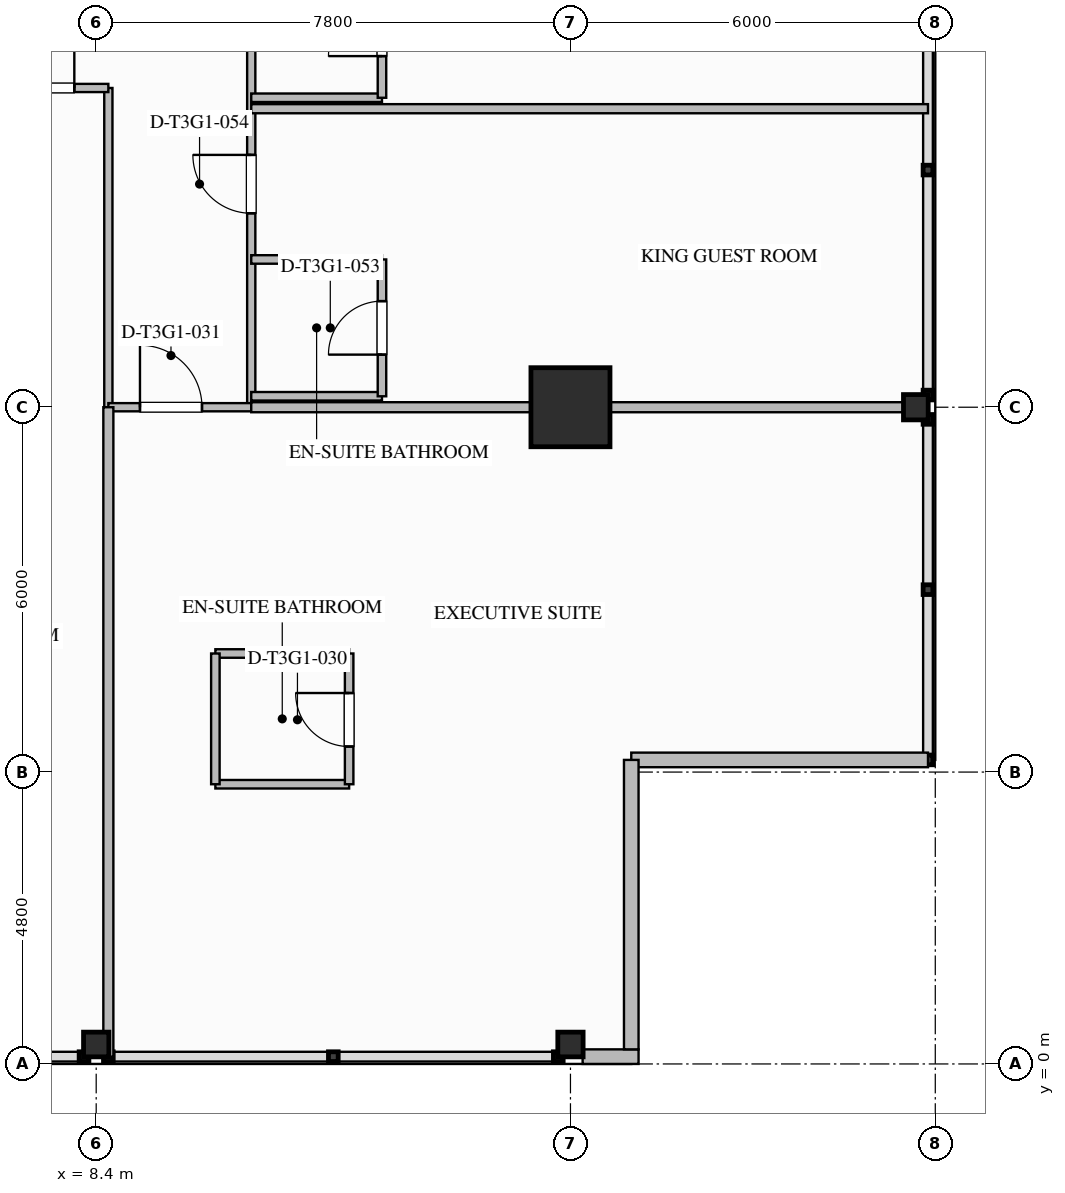
"""IFC4 building model, lengths in metres.
Left out: names, types, materials, properties, quantities, classifications, styles, units other than length and angle.
Written with IfcOpenShell. Run it as: python <this file> out.ifc"""

import sys

from ifc_helpers import new_model, si_unit, direction, frame, frame_2d, origin, origin_2d, place, context, subcontext, project, spatial, rectangle, i_section, extrude, element, fill, save


model = new_model("IFC4")
c1 = context("Model", 3, precision=1e-05, world=origin(), true_north=direction((0.0, 1.0)))
c2 = subcontext(c1, "Body", "Model", "MODEL_VIEW")
j1 = project(units=[si_unit("LENGTHUNIT", "METRE"), si_unit("PLANEANGLEUNIT", "RADIAN")], contexts=[c1])
p1 = place(None, origin())
s1 = spatial("IfcSite", under=j1, at=p1, CompositionType="ELEMENT")
p2 = place(p1, origin())
s2 = spatial("IfcBuilding", under=s1, at=p2, CompositionType="ELEMENT")
p3 = place(p2, frame((0.0, 0.0, 150.4)))
s3 = spatial("IfcBuildingStorey", under=s2, at=p3, CompositionType="ELEMENT", Elevation=150.4)
p4 = place(p3, frame((16.2, 10.8, 0.0), z_axis=(0.0, 0.0, 1.0), x_axis=(1.0, 0.0, 0.0)))
e1 = element("IfcColumn", 1, at=p4, inside=s3, PredefinedType="COLUMN", context=c2, shape_type="SweptSolid", body=[
    extrude(rectangle(XDim=1.3, YDim=1.3, at=origin_2d()), origin(), (0.0, 0.0, 1.0), 3.55),
])
for number, where, z_axis, x_axis in (
    (2, (21.88, 10.8, 0.0), (0.0, 0.0, 1.0), (1.0, 0.0, 0.0)),
    (3, (8.4, 0.32, 0.0), (0.0, 0.0, 1.0), (0.0, 1.0, 0.0)),
    (4, (16.2, 0.32, 0.0), (0.0, 0.0, 1.0), (0.0, 1.0, 0.0)),
):
    element("IfcColumn", number, at=place(p3, frame(where, z_axis=z_axis, x_axis=x_axis)), inside=s3, PredefinedType="COLUMN", context=c2, shape_type="SweptSolid", body=[
        extrude(i_section(OverallWidth=0.406, OverallDepth=0.416, WebThickness=0.03, FlangeThickness=0.048, FilletRadius=0.028, at=origin_2d()), origin(), (0.0, 0.0, 1.0), 3.547),
    ])
p5 = place(p3, frame((17.32, 0.12, 0.0), z_axis=(0.0, 0.0, 1.0), x_axis=(-1.0, 0.0, 0.0)))
e5 = element("IfcWall", 5, at=p5, inside=s3, PredefinedType="STANDARD", context=c2, shape_type="SweptSolid", body=[
    extrude(rectangle(XDim=0.92, YDim=0.24, at=frame_2d((0.46, 0.0))), origin(), (0.0, 0.0, 1.0), 3.29),
])
p6 = place(p3, frame((22.08, 5.0, 0.0), z_axis=(0.0, 0.0, 1.0), x_axis=(-1.0, 0.0, 0.0)))
e6 = element("IfcWall", 6, at=p6, inside=s3, PredefinedType="STANDARD", context=c2, shape_type="SweptSolid", body=[
    extrude(rectangle(XDim=4.88, YDim=0.24, at=frame_2d((2.44, 0.0))), origin(), (0.0, 0.0, 1.0), 3.29),
])
p7 = place(p3, frame((17.2, 5.0, 0.0), z_axis=(0.0, 0.0, 1.0), x_axis=(0.0, -1.0, 0.0)))
e7 = element("IfcWall", 7, at=p7, inside=s3, PredefinedType="STANDARD", context=c2, shape_type="SweptSolid", body=[
    extrude(rectangle(XDim=4.76, YDim=0.24, at=frame_2d((2.38, 0.0))), origin(), (0.0, 0.0, 1.0), 3.29),
])
p8 = place(p3, frame((8.6, 10.8, 0.0), z_axis=(0.0, 0.0, 1.0), x_axis=(0.0, 1.0, 0.0)))
e8 = element("IfcWall", 8, at=p8, inside=s3, PredefinedType="PARTITIONING", context=c2, shape_type="SweptSolid", body=[
    extrude(rectangle(XDim=5.25, YDim=0.135, at=frame_2d((2.625, 0.0))), origin(), (0.0, 0.0, 1.0), 2.667),
])
p9 = place(p3, frame((-16.2, 16.05, 0.0), z_axis=(0.0, 0.0, 1.0), x_axis=(1.0, 0.0, 0.0)))
e9 = element("IfcWall", 9, at=p9, inside=s3, PredefinedType="PARTITIONING", context=c2, shape_type="SweptSolid", body=[
    extrude(rectangle(XDim=24.8, YDim=0.135, at=frame_2d((12.4, 0.0))), origin(), (0.0, 0.0, 1.0), 3.29),
])
p10 = place(p9, frame((2.785, 0.0, 0.0)))
e10 = element("IfcOpeningElement", 10, at=p10, cuts=e9, PredefinedType="OPENING", context=c2, shape_type="SweptSolid", body=[
    extrude(rectangle(XDim=0.96, YDim=2.15, at=frame_2d((0.48, 1.075))), frame((0.0, 0.077, 0.0), z_axis=(0.0, -1.0, 0.0), x_axis=(1.0, 0.0, 0.0)), (0.0, 0.0, 1.0), 0.155),
])
p11 = place(p9, frame((7.595, 0.0, 0.0)))
e11 = element("IfcOpeningElement", 11, at=p11, cuts=e9, PredefinedType="OPENING", context=c2, shape_type="SweptSolid", body=[
    extrude(rectangle(XDim=1.26, YDim=2.2, at=frame_2d((0.63, 1.1))), frame((0.0, 0.077, 0.0), z_axis=(0.0, -1.0, 0.0), x_axis=(1.0, 0.0, 0.0)), (0.0, 0.0, 1.0), 0.155),
])
p12 = place(p9, frame((11.89, 0.0, 0.0)))
e12 = element("IfcOpeningElement", 12, at=p12, cuts=e9, PredefinedType="OPENING", context=c2, shape_type="SweptSolid", body=[
    extrude(rectangle(XDim=1.02, YDim=2.15, at=frame_2d((0.51, 1.075))), frame((0.0, 0.077, 0.0), z_axis=(0.0, -1.0, 0.0), x_axis=(1.0, 0.0, 0.0)), (0.0, 0.0, 1.0), 0.155),
])
p13 = place(p9, frame((18.17, 0.0, 0.0)))
e13 = element("IfcOpeningElement", 13, at=p13, cuts=e9, PredefinedType="OPENING", context=c2, shape_type="SweptSolid", body=[
    extrude(rectangle(XDim=1.26, YDim=2.2, at=frame_2d((0.63, 1.1))), frame((0.0, 0.077, 0.0), z_axis=(0.0, -1.0, 0.0), x_axis=(1.0, 0.0, 0.0)), (0.0, 0.0, 1.0), 0.155),
])
p14 = place(p9, frame((23.281, 0.0, 0.0)))
e14 = element("IfcOpeningElement", 14, at=p14, cuts=e9, PredefinedType="OPENING", context=c2, shape_type="SweptSolid", body=[
    extrude(rectangle(XDim=0.96, YDim=2.15, at=frame_2d((0.48, 1.075))), frame((0.0, 0.077, 0.0), z_axis=(0.0, -1.0, 0.0), x_axis=(1.0, 0.0, 0.0)), (0.0, 0.0, 1.0), 0.155),
])
p15 = place(p3, frame((10.95, 10.8, 0.0), z_axis=(0.0, 0.0, 1.0), x_axis=(0.0, 1.0, 0.0)))
e15 = element("IfcWall", 15, at=p15, inside=s3, PredefinedType="PARTITIONING", context=c2, shape_type="SweptSolid", body=[
    extrude(rectangle(XDim=32.4, YDim=0.135, at=frame_2d((16.2, 0.0))), origin(), (0.0, 0.0, 1.0), 3.29),
])
p16 = place(p15, frame((3.189, 0.0, 0.0)))
e16 = element("IfcOpeningElement", 16, at=p16, cuts=e15, PredefinedType="OPENING", context=c2, shape_type="SweptSolid", body=[
    extrude(rectangle(XDim=0.96, YDim=2.15, at=frame_2d((0.48, 1.075))), frame((0.0, 0.077, 0.0), z_axis=(0.0, -1.0, 0.0), x_axis=(1.0, 0.0, 0.0)), (0.0, 0.0, 1.0), 0.155),
])
p17 = place(p15, frame((8.59, 0.0, 0.0)))
e17 = element("IfcOpeningElement", 17, at=p17, cuts=e15, PredefinedType="OPENING", context=c2, shape_type="SweptSolid", body=[
    extrude(rectangle(XDim=0.96, YDim=2.15, at=frame_2d((0.48, 1.075))), frame((0.0, 0.077, 0.0), z_axis=(0.0, -1.0, 0.0), x_axis=(1.0, 0.0, 0.0)), (0.0, 0.0, 1.0), 0.155),
])
p18 = place(p15, frame((12.99, 0.0, 0.0)))
e18 = element("IfcOpeningElement", 18, at=p18, cuts=e15, PredefinedType="OPENING", context=c2, shape_type="SweptSolid", body=[
    extrude(rectangle(XDim=1.02, YDim=2.15, at=frame_2d((0.51, 1.075))), frame((0.0, 0.077, 0.0), z_axis=(0.0, -1.0, 0.0), x_axis=(1.0, 0.0, 0.0)), (0.0, 0.0, 1.0), 0.155),
])
p19 = place(p15, frame((19.635, 0.0, 0.0)))
e19 = element("IfcOpeningElement", 19, at=p19, cuts=e15, PredefinedType="OPENING", context=c2, shape_type="SweptSolid", body=[
    extrude(rectangle(XDim=0.96, YDim=2.15, at=frame_2d((0.48, 1.075))), frame((0.0, 0.077, 0.0), z_axis=(0.0, -1.0, 0.0), x_axis=(1.0, 0.0, 0.0)), (0.0, 0.0, 1.0), 0.155),
])
p20 = place(p15, frame((25.281, 0.0, 0.0)))
e20 = element("IfcOpeningElement", 20, at=p20, cuts=e15, PredefinedType="OPENING", context=c2, shape_type="SweptSolid", body=[
    extrude(rectangle(XDim=0.96, YDim=2.15, at=frame_2d((0.48, 1.075))), frame((0.0, 0.077, 0.0), z_axis=(0.0, -1.0, 0.0), x_axis=(1.0, 0.0, 0.0)), (0.0, 0.0, 1.0), 0.155),
])
p21 = place(p15, frame((30.68, 0.0, 0.0)))
e21 = element("IfcOpeningElement", 21, at=p21, cuts=e15, PredefinedType="OPENING", context=c2, shape_type="SweptSolid", body=[
    extrude(rectangle(XDim=0.96, YDim=2.15, at=frame_2d((0.48, 1.075))), frame((0.0, 0.077, 0.0), z_axis=(0.0, -1.0, 0.0), x_axis=(1.0, 0.0, 0.0)), (0.0, 0.0, 1.0), 0.155),
])
p22 = place(p3, frame((8.6, 10.8, 0.0), z_axis=(0.0, 0.0, 1.0), x_axis=(1.0, 0.0, 0.0)))
e22 = element("IfcWall", 22, at=p22, inside=s3, PredefinedType="PARTITIONING", context=c2, shape_type="SweptSolid", body=[
    extrude(rectangle(XDim=2.35, YDim=0.135, at=frame_2d((1.175, 0.0))), origin(), (0.0, 0.0, 1.0), 2.58),
])
p23 = place(p22, frame((0.52, 0.0, 0.0)))
e23 = element("IfcOpeningElement", 23, at=p23, cuts=e22, PredefinedType="OPENING", context=c2, shape_type="SweptSolid", body=[
    extrude(rectangle(XDim=1.02, YDim=2.15, at=frame_2d((0.51, 1.075))), frame((0.0, 0.077, 0.0), z_axis=(0.0, -1.0, 0.0), x_axis=(1.0, 0.0, 0.0)), (0.0, 0.0, 1.0), 0.155),
])
p24 = place(p3, frame((8.6, 0.12, 0.0), z_axis=(0.0, 0.0, 1.0), x_axis=(0.0, 1.0, 0.0)))
e24 = element("IfcWall", 24, at=p24, inside=s3, PredefinedType="PARTITIONING", context=c2, shape_type="SweptSolid", body=[
    extrude(rectangle(XDim=10.68, YDim=0.165, at=frame_2d((5.34, 0.0))), origin(), (0.0, 0.0, 1.0), 2.58),
])
p25 = place(p3, frame((10.95, 10.8, 0.0), z_axis=(0.0, 0.0, 1.0), x_axis=(1.0, 0.0, 0.0)))
e25 = element("IfcWall", 25, at=p25, inside=s3, PredefinedType="PARTITIONING", context=c2, shape_type="SweptSolid", body=[
    extrude(rectangle(XDim=11.13, YDim=0.165, at=frame_2d((5.565, 0.0))), origin(), (0.0, 0.0, 1.0), 2.58),
])
for number, where, z_axis, x_axis in (
    (26, (10.36, 4.6, 0.0), (0.0, 0.0, 1.0), (1.0, 0.0, 0.0)),
    (27, (10.36, 6.75, 0.0), (0.0, 0.0, 1.0), (1.0, 0.0, 0.0)),
):
    element("IfcWall", number, at=place(p3, frame(where, z_axis=z_axis, x_axis=x_axis)), inside=s3, PredefinedType="PLUMBINGWALL", context=c2, shape_type="SweptSolid", body=[
        extrude(rectangle(XDim=2.2, YDim=0.14, at=frame_2d((1.1, 0.0))), origin(), (0.0, 0.0, 1.0), 3.29),
    ])
p26 = place(p3, frame((10.36, 4.6, 0.0), z_axis=(0.0, 0.0, 1.0), x_axis=(0.0, 1.0, 0.0)))
e28 = element("IfcWall", 28, at=p26, inside=s3, PredefinedType="PLUMBINGWALL", context=c2, shape_type="SweptSolid", body=[
    extrude(rectangle(XDim=2.15, YDim=0.14, at=frame_2d((1.075, 0.0))), origin(), (0.0, 0.0, 1.0), 3.29),
])
p27 = place(p3, frame((12.56, 4.6, 0.0), z_axis=(0.0, 0.0, 1.0), x_axis=(0.0, 1.0, 0.0)))
e29 = element("IfcWall", 29, at=p27, inside=s3, PredefinedType="PLUMBINGWALL", context=c2, shape_type="SweptSolid", body=[
    extrude(rectangle(XDim=2.15, YDim=0.14, at=frame_2d((1.075, 0.0))), origin(), (0.0, 0.0, 1.0), 3.29),
])
p28 = place(p27, frame((0.62, 0.0, 0.0)))
e30 = element("IfcOpeningElement", 30, at=p28, cuts=e29, PredefinedType="OPENING", context=c2, shape_type="SweptSolid", body=[
    extrude(rectangle(XDim=0.88, YDim=2.1, at=frame_2d((0.44, 1.05))), frame((0.0, 0.08, 0.0), z_axis=(0.0, -1.0, 0.0), x_axis=(1.0, 0.0, 0.0)), (0.0, 0.0, 1.0), 0.16),
])
p29 = place(p3, frame((10.95, 10.98, 0.0), z_axis=(0.0, 0.0, 1.0), x_axis=(1.0, 0.0, 0.0)))
e31 = element("IfcWall", 31, at=p29, inside=s3, PredefinedType="PLUMBINGWALL", context=c2, shape_type="SweptSolid", body=[
    extrude(rectangle(XDim=2.15, YDim=0.14, at=frame_2d((1.075, 0.0))), origin(), (0.0, 0.0, 1.0), 2.58),
])
p30 = place(p3, frame((10.95, 13.23, 0.0), z_axis=(0.0, 0.0, 1.0), x_axis=(1.0, 0.0, 0.0)))
e32 = element("IfcWall", 32, at=p30, inside=s3, PredefinedType="PLUMBINGWALL", context=c2, shape_type="SweptSolid", body=[
    extrude(rectangle(XDim=2.15, YDim=0.14, at=frame_2d((1.075, 0.0))), origin(), (0.0, 0.0, 1.0), 3.29),
])
p31 = place(p3, frame((13.1, 10.98, 0.0), z_axis=(0.0, 0.0, 1.0), x_axis=(0.0, 1.0, 0.0)))
e33 = element("IfcWall", 33, at=p31, inside=s3, PredefinedType="PLUMBINGWALL", context=c2, shape_type="SweptSolid", body=[
    extrude(rectangle(XDim=2.25, YDim=0.14, at=frame_2d((1.125, 0.0))), origin(), (0.0, 0.0, 1.0), 3.29),
])
p32 = place(p31, frame((0.685, 0.0, 0.0)))
e34 = element("IfcOpeningElement", 34, at=p32, cuts=e33, PredefinedType="OPENING", context=c2, shape_type="SweptSolid", body=[
    extrude(rectangle(XDim=0.88, YDim=2.1, at=frame_2d((0.44, 1.05))), frame((0.0, 0.08, 0.0), z_axis=(0.0, -1.0, 0.0), x_axis=(1.0, 0.0, 0.0)), (0.0, 0.0, 1.0), 0.16),
])
p33 = place(p3, frame((10.95, 15.709, 0.0), z_axis=(0.0, 0.0, 1.0), x_axis=(1.0, 0.0, 0.0)))
e35 = element("IfcWall", 35, at=p33, inside=s3, PredefinedType="PARTITIONING", context=c2, shape_type="SweptSolid", body=[
    extrude(rectangle(XDim=11.13, YDim=0.15, at=frame_2d((5.565, 0.0))), origin(), (0.0, 0.0, 1.0), 3.29),
])
p34 = place(p3, frame((10.95, 15.889, 0.0), z_axis=(0.0, 0.0, 1.0), x_axis=(1.0, 0.0, 0.0)))
e36 = element("IfcWall", 36, at=p34, inside=s3, PredefinedType="PLUMBINGWALL", context=c2, shape_type="SweptSolid", body=[
    extrude(rectangle(XDim=2.15, YDim=0.14, at=frame_2d((1.075, 0.0))), origin(), (0.0, 0.0, 1.0), 3.29),
])
p35 = place(p3, frame((13.1, 15.889, 0.0), z_axis=(0.0, 0.0, 1.0), x_axis=(0.0, 1.0, 0.0)))
e37 = element("IfcWall", 37, at=p35, inside=s3, PredefinedType="PLUMBINGWALL", context=c2, shape_type="SweptSolid", body=[
    extrude(rectangle(XDim=2.25, YDim=0.14, at=frame_2d((1.125, 0.0))), origin(), (0.0, 0.0, 1.0), 3.29),
])
p36 = place(p35, frame((0.685, 0.0, 0.0)))
e38 = element("IfcOpeningElement", 38, at=p36, cuts=e37, PredefinedType="OPENING", context=c2, shape_type="SweptSolid", body=[
    extrude(rectangle(XDim=0.88, YDim=2.1, at=frame_2d((0.44, 1.05))), frame((0.0, 0.08, 0.0), z_axis=(0.0, -1.0, 0.0), x_axis=(1.0, 0.0, 0.0)), (0.0, 0.0, 1.0), 0.16),
])
p37 = place(p28, origin())
e39 = element("IfcDoor", 39, at=p37, inside=s3, OperationType="SINGLE_SWING_RIGHT", PredefinedType="DOOR", context=c2, shape_type="SweptSolid", body=[
    extrude(rectangle(XDim=0.88, YDim=2.1, at=frame_2d((0.44, 1.05))), frame((0.0, 0.025, 0.0), z_axis=(0.0, -1.0, 0.0), x_axis=(1.0, 0.0, 0.0)), (0.0, 0.0, 1.0), 0.05),
])
fill(e30, e39)
p38 = place(p23, origin())
e40 = element("IfcDoor", 40, at=p38, inside=s3, OperationType="SINGLE_SWING_LEFT", PredefinedType="DOOR", context=c2, shape_type="SweptSolid", body=[
    extrude(rectangle(XDim=1.02, YDim=2.15, at=frame_2d((0.51, 1.075))), frame((0.0, 0.025, 0.0), z_axis=(0.0, -1.0, 0.0), x_axis=(1.0, 0.0, 0.0)), (0.0, 0.0, 1.0), 0.05),
])
fill(e23, e40)
p39 = place(p14, origin())
e41 = element("IfcDoor", 41, at=p39, inside=s3, OperationType="SINGLE_SWING_RIGHT", PredefinedType="DOOR", context=c2, shape_type="SweptSolid", body=[
    extrude(rectangle(XDim=0.96, YDim=2.15, at=frame_2d((0.48, 1.075))), frame((0.0, 0.025, 0.0), z_axis=(0.0, -1.0, 0.0), x_axis=(1.0, 0.0, 0.0)), (0.0, 0.0, 1.0), 0.05),
])
fill(e14, e41)
p40 = place(p32, origin())
e42 = element("IfcDoor", 42, at=p40, inside=s3, OperationType="SINGLE_SWING_LEFT", PredefinedType="DOOR", context=c2, shape_type="SweptSolid", body=[
    extrude(rectangle(XDim=0.88, YDim=2.1, at=frame_2d((0.44, 1.05))), frame((0.0, 0.025, 0.0), z_axis=(0.0, -1.0, 0.0), x_axis=(1.0, 0.0, 0.0)), (0.0, 0.0, 1.0), 0.05),
])
fill(e34, e42)
p41 = place(p16, origin())
e43 = element("IfcDoor", 43, at=p41, inside=s3, OperationType="SINGLE_SWING_RIGHT", PredefinedType="DOOR", context=c2, shape_type="SweptSolid", body=[
    extrude(rectangle(XDim=0.96, YDim=2.15, at=frame_2d((0.48, 1.075))), frame((0.0, 0.025, 0.0), z_axis=(0.0, -1.0, 0.0), x_axis=(1.0, 0.0, 0.0)), (0.0, 0.0, 1.0), 0.05),
])
fill(e16, e43)
p42 = place(p36, origin())
e44 = element("IfcDoor", 44, at=p42, inside=s3, OperationType="SINGLE_SWING_LEFT", PredefinedType="DOOR", context=c2, shape_type="SweptSolid", body=[
    extrude(rectangle(XDim=0.88, YDim=2.1, at=frame_2d((0.44, 1.05))), frame((0.0, 0.025, 0.0), z_axis=(0.0, -1.0, 0.0), x_axis=(1.0, 0.0, 0.0)), (0.0, 0.0, 1.0), 0.05),
])
fill(e38, e44)
save(model, sys.argv[1])
